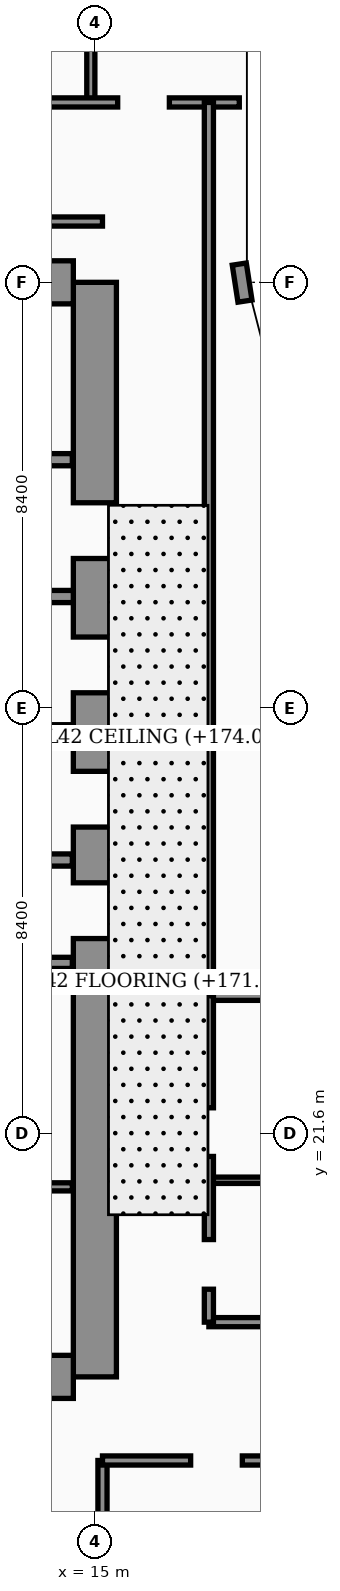
"""IFC4 building model, lengths in metres.
Left out: names, types, materials, properties, quantities, classifications, styles, units other than length and angle.
Written with IfcOpenShell. Run it as: python <this file> out.ifc"""

import sys

from ifc_helpers import new_model, si_unit, direction, frame, frame_2d, origin, place, context, subcontext, project, spatial, rectangle, extrude, element, fill, save


model = new_model("IFC4")
c1 = context("Model", 3, precision=1e-05, world=origin(), true_north=direction((0.0, 1.0)))
c2 = subcontext(c1, "Body", "Model", "MODEL_VIEW")
j1 = project(units=[si_unit("LENGTHUNIT", "METRE"), si_unit("PLANEANGLEUNIT", "RADIAN")], contexts=[c1])
p1 = place(None, origin())
s1 = spatial("IfcSite", under=j1, at=p1, CompositionType="ELEMENT")
p2 = place(p1, origin())
s2 = spatial("IfcBuilding", under=s1, at=p2, CompositionType="ELEMENT")
p3 = place(p2, frame((0.0, 0.0, 171.3)))
s3 = spatial("IfcBuildingStorey", under=s2, at=p3, CompositionType="ELEMENT", Elevation=171.3)
p4 = place(p3, frame((15.0, 16.8, 0.0), z_axis=(0.0, 0.0, 1.0), x_axis=(0.0, 1.0, 0.0)))
e1 = element("IfcWall", 1, at=p4, inside=s3, PredefinedType="SHEAR", context=c2, shape_type="SweptSolid", body=[
    extrude(rectangle(XDim=21.6, YDim=0.85, at=frame_2d((10.8, 0.0))), origin(), (0.0, 0.0, 1.0), 3.56),
])
p5 = place(p4, frame((8.65, 0.0, 0.0)))
e2 = element("IfcOpeningElement", 2, at=p5, cuts=e1, PredefinedType="OPENING", context=c2, shape_type="SweptSolid", body=[
    extrude(rectangle(XDim=1.1, YDim=2.2, at=frame_2d((0.55, 1.1))), frame((0.0, 0.435, 0.0), z_axis=(0.0, -1.0, 0.0), x_axis=(1.0, 0.0, 0.0)), (0.0, 0.0, 1.0), 0.87),
])
p6 = place(p4, frame((10.85, 0.0, 0.0)))
e3 = element("IfcOpeningElement", 3, at=p6, cuts=e1, PredefinedType="OPENING", context=c2, shape_type="SweptSolid", body=[
    extrude(rectangle(XDim=1.1, YDim=2.2, at=frame_2d((0.55, 1.1))), frame((0.0, 0.435, 0.0), z_axis=(0.0, -1.0, 0.0), x_axis=(1.0, 0.0, 0.0)), (0.0, 0.0, 1.0), 0.87),
])
p7 = place(p4, frame((13.5, 0.0, 0.0)))
e4 = element("IfcOpeningElement", 4, at=p7, cuts=e1, PredefinedType="OPENING", context=c2, shape_type="SweptSolid", body=[
    extrude(rectangle(XDim=1.1, YDim=2.2, at=frame_2d((0.55, 1.1))), frame((0.0, 0.435, 0.0), z_axis=(0.0, -1.0, 0.0), x_axis=(1.0, 0.0, 0.0)), (0.0, 0.0, 1.0), 0.87),
])
p8 = place(p4, frame((16.15, 0.0, 0.0)))
e5 = element("IfcOpeningElement", 5, at=p8, cuts=e1, PredefinedType="OPENING", context=c2, shape_type="SweptSolid", body=[
    extrude(rectangle(XDim=1.1, YDim=2.2, at=frame_2d((0.55, 1.1))), frame((0.0, 0.435, 0.0), z_axis=(0.0, -1.0, 0.0), x_axis=(1.0, 0.0, 0.0)), (0.0, 0.0, 1.0), 0.87),
])
for number, where, z_axis, x_axis in (
    (6, (4.625, 38.4, 0.0), (0.0, 0.0, 1.0), (1.0, 0.0, 0.0)),
    (7, (4.625, 16.8, 0.0), (0.0, 0.0, 1.0), (1.0, 0.0, 0.0)),
):
    element("IfcWall", number, at=place(p3, frame(where, z_axis=z_axis, x_axis=x_axis)), inside=s3, PredefinedType="SHEAR", context=c2, shape_type="SweptSolid", body=[
        extrude(rectangle(XDim=9.95, YDim=0.85, at=frame_2d((4.975, 0.0))), origin(), (0.0, 0.0, 1.0), 3.56),
    ])
for number, where, z_axis, x_axis in (
    (8, (12.18, 29.55, 0.0), (0.0, 0.0, 1.0), (1.0, 0.0, 0.0)),
    (9, (12.18, 32.2, 0.0), (0.0, 0.0, 1.0), (1.0, 0.0, 0.0)),
):
    element("IfcWall", number, at=place(p3, frame(where, z_axis=z_axis, x_axis=x_axis)), inside=s3, PredefinedType="SOLIDWALL", context=c2, shape_type="SweptSolid", body=[
        extrude(rectangle(XDim=2.395, YDim=0.24, at=frame_2d((1.198, 0.0))), origin(), (0.0, 0.0, 1.0), 3.56),
    ])
p9 = place(p3, frame((17.962, 38.03, 0.0), z_axis=(0.0, 0.0, 1.0), x_axis=(-0.15141125477, 0.988470855377, 0.0)))
e10 = element("IfcWall", 10, at=p9, inside=s3, PredefinedType="SOLIDWALL", context=c2, shape_type="SweptSolid", body=[
    extrude(rectangle(XDim=0.739, YDim=0.28, at=frame_2d((0.369, 0.0))), origin(), (0.0, 0.0, 1.0), 3.56),
])
p10 = place(p3, frame((9.68, 20.55, 0.0), z_axis=(0.0, 0.0, 1.0), x_axis=(1.0, 0.0, 0.0)))
e11 = element("IfcWall", 11, at=p10, inside=s3, PredefinedType="PARTITIONING", context=c2, shape_type="SweptSolid", body=[
    extrude(rectangle(XDim=4.875, YDim=0.16, at=frame_2d((2.438, 0.0))), origin(), (0.0, 0.0, 1.0), 3.56),
])
p11 = place(p10, frame((1.1, 0.0, 0.0)))
e12 = element("IfcOpeningElement", 12, at=p11, cuts=e11, PredefinedType="OPENING", context=c2, shape_type="SweptSolid", body=[
    extrude(rectangle(XDim=0.98, YDim=2.15, at=frame_2d((0.49, 1.075))), frame((0.0, 0.09, 0.0), z_axis=(0.0, -1.0, 0.0), x_axis=(1.0, 0.0, 0.0)), (0.0, 0.0, 1.0), 0.18),
])
p12 = place(p3, frame((9.68, 24.97, 0.0), z_axis=(0.0, 0.0, 1.0), x_axis=(1.0, 0.0, 0.0)))
e13 = element("IfcWall", 13, at=p12, inside=s3, PredefinedType="SOLIDWALL", context=c2, shape_type="SweptSolid", body=[
    extrude(rectangle(XDim=4.875, YDim=0.22, at=frame_2d((2.438, 0.0))), origin(), (0.0, 0.0, 1.0), 2.94),
])
p13 = place(p12, frame((0.9, 0.0, 0.0)))
e14 = element("IfcOpeningElement", 14, at=p13, cuts=e13, PredefinedType="OPENING", context=c2, shape_type="SweptSolid", body=[
    extrude(rectangle(XDim=0.98, YDim=2.15, at=frame_2d((0.49, 1.075))), frame((0.0, 0.12, 0.0), z_axis=(0.0, -1.0, 0.0), x_axis=(1.0, 0.0, 0.0)), (0.0, 0.0, 1.0), 0.24),
])
p14 = place(p3, frame((12.25, 27.0, 0.0), z_axis=(0.0, 0.0, 1.0), x_axis=(1.0, 0.0, 0.0)))
e15 = element("IfcWall", 15, at=p14, inside=s3, PredefinedType="SOLIDWALL", context=c2, shape_type="SweptSolid", body=[
    extrude(rectangle(XDim=2.305, YDim=0.24, at=frame_2d((1.152, 0.0))), origin(), (0.0, 0.0, 1.0), 3.56),
])
p15 = place(p3, frame((9.66, 34.9, 0.0), z_axis=(0.0, 0.0, 1.0), x_axis=(1.0, 0.0, 0.0)))
e16 = element("IfcWall", 16, at=p15, inside=s3, PredefinedType="SOLIDWALL", context=c2, shape_type="SweptSolid", body=[
    extrude(rectangle(XDim=4.895, YDim=0.24, at=frame_2d((2.448, 0.0))), origin(), (0.0, 0.0, 1.0), 3.56),
])
p16 = place(p3, frame((15.15, 2.44, 0.0), z_axis=(0.0, 0.0, 1.0), x_axis=(0.0, 1.0, 0.0)))
e17 = element("IfcWall", 17, at=p16, inside=s3, PredefinedType="PARTITIONING", context=c2, shape_type="SweptSolid", body=[
    extrude(rectangle(XDim=12.71, YDim=0.18, at=frame_2d((6.355, 0.0))), origin(), (0.0, 0.0, 1.0), 3.04),
])
p17 = place(p3, frame((15.15, 15.15, 0.0), z_axis=(0.0, 0.0, 1.0), x_axis=(1.0, 0.0, 0.0)))
e18 = element("IfcWall", 18, at=p17, inside=s3, PredefinedType="PARTITIONING", context=c2, shape_type="SweptSolid", body=[
    extrude(rectangle(XDim=6.45, YDim=0.18, at=frame_2d((3.225, 0.0))), origin(), (0.0, 0.0, 1.0), 2.49),
])
p18 = place(p17, frame((1.74, 0.0, 0.0)))
e19 = element("IfcOpeningElement", 19, at=p18, cuts=e18, PredefinedType="OPENING", context=c2, shape_type="SweptSolid", body=[
    extrude(rectangle(XDim=1.02, YDim=2.2, at=frame_2d((0.51, 1.1))), frame((0.0, 0.1, 0.0), z_axis=(0.0, -1.0, 0.0), x_axis=(1.0, 0.0, 0.0)), (0.0, 0.0, 1.0), 0.2),
])
p19 = place(p3, frame((14.92, 41.95, 0.0), z_axis=(0.0, 0.0, 1.0), x_axis=(0.0, 1.0, 0.0)))
e20 = element("IfcWall", 20, at=p19, inside=s3, PredefinedType="PARTITIONING", context=c2, shape_type="SweptSolid", body=[
    extrude(rectangle(XDim=5.85, YDim=0.16, at=frame_2d((2.925, 0.0))), origin(), (0.0, 0.0, 1.0), 3.04),
])
p20 = place(p3, frame((0.08, 41.95, 0.0), z_axis=(0.0, 0.0, 1.0), x_axis=(1.0, 0.0, 0.0)))
e21 = element("IfcWall", 21, at=p20, inside=s3, PredefinedType="PARTITIONING", context=c2, shape_type="SweptSolid", body=[
    extrude(rectangle(XDim=17.77, YDim=0.18, at=frame_2d((8.885, 0.0))), origin(), (0.0, 0.0, 1.0), 2.94),
])
p21 = place(p20, frame((0.9, 0.0, 0.0)))
e22 = element("IfcOpeningElement", 22, at=p21, cuts=e21, PredefinedType="OPENING", context=c2, shape_type="SweptSolid", body=[
    extrude(rectangle(XDim=1.02, YDim=2.2, at=frame_2d((0.51, 1.1))), frame((0.0, 0.1, 0.0), z_axis=(0.0, -1.0, 0.0), x_axis=(1.0, 0.0, 0.0)), (0.0, 0.0, 1.0), 0.2),
])
p22 = place(p20, frame((7.38, 0.0, 0.0)))
e23 = element("IfcOpeningElement", 23, at=p22, cuts=e21, PredefinedType="OPENING", context=c2, shape_type="SweptSolid", body=[
    extrude(rectangle(XDim=1.02, YDim=2.2, at=frame_2d((0.51, 1.1))), frame((0.0, 0.1, 0.0), z_axis=(0.0, -1.0, 0.0), x_axis=(1.0, 0.0, 0.0)), (0.0, 0.0, 1.0), 0.2),
])
p23 = place(p20, frame((15.37, 0.0, 0.0)))
e24 = element("IfcOpeningElement", 24, at=p23, cuts=e21, PredefinedType="OPENING", context=c2, shape_type="SweptSolid", body=[
    extrude(rectangle(XDim=1.02, YDim=2.2, at=frame_2d((0.51, 1.1))), frame((0.0, 0.1, 0.0), z_axis=(0.0, -1.0, 0.0), x_axis=(1.0, 0.0, 0.0)), (0.0, 0.0, 1.0), 0.2),
])
p24 = place(p3, frame((17.25, 24.3, 0.0), z_axis=(0.0, 0.0, 1.0), x_axis=(0.0, 1.0, 0.0)))
e25 = element("IfcWall", 25, at=p24, inside=s3, PredefinedType="PARTITIONING", context=c2, shape_type="SweptSolid", body=[
    extrude(rectangle(XDim=17.65, YDim=0.18, at=frame_2d((8.825, 0.0))), origin(), (0.0, 0.0, 1.0), 2.94),
])
p25 = place(p3, frame((3.755, 39.6, 0.0), z_axis=(0.0, 0.0, 1.0), x_axis=(1.0, 0.0, 0.0)))
e26 = element("IfcWall", 26, at=p25, inside=s3, PredefinedType="PARTITIONING", context=c2, shape_type="SweptSolid", body=[
    extrude(rectangle(XDim=11.395, YDim=0.18, at=frame_2d((5.698, 0.0))), origin(), (0.0, 0.0, 1.0), 2.94),
])
p26 = place(p3, frame((17.25, 17.88, 0.0), z_axis=(0.0, 0.0, 1.0), x_axis=(1.0, 0.0, 0.0)))
e27 = element("IfcWall", 27, at=p26, inside=s3, PredefinedType="PARTITIONING", context=c2, shape_type="SweptSolid", body=[
    extrude(rectangle(XDim=4.3, YDim=0.18, at=frame_2d((2.15, 0.0))), origin(), (0.0, 0.0, 1.0), 3.09),
])
p27 = place(p3, frame((17.25, 20.68, 0.0), z_axis=(0.0, 0.0, 1.0), x_axis=(1.0, 0.0, 0.0)))
e28 = element("IfcWall", 28, at=p27, inside=s3, PredefinedType="PARTITIONING", context=c2, shape_type="SweptSolid", body=[
    extrude(rectangle(XDim=4.3, YDim=0.125, at=frame_2d((2.15, 0.0))), origin(), (0.0, 0.0, 1.0), 3.56),
])
p28 = place(p3, frame((17.25, 24.32, 0.0), z_axis=(0.0, 0.0, 1.0), x_axis=(1.0, 0.0, 0.0)))
e29 = element("IfcWall", 29, at=p28, inside=s3, PredefinedType="PARTITIONING", context=c2, shape_type="SweptSolid", body=[
    extrude(rectangle(XDim=4.35, YDim=0.18, at=frame_2d((2.175, 0.0))), origin(), (0.0, 0.0, 1.0), 3.56),
])
p29 = place(p3, frame((17.25, 17.88, 0.0), z_axis=(0.0, 0.0, 1.0), x_axis=(0.0, 1.0, 0.0)))
e30 = element("IfcWall", 30, at=p29, inside=s3, PredefinedType="PARTITIONING", context=c2, shape_type="SweptSolid", body=[
    extrude(rectangle(XDim=6.44, YDim=0.18, at=frame_2d((3.22, 0.0))), origin(), (0.0, 0.0, 1.0), 3.09),
])
p30 = place(p29, frame((0.65, 0.0, 0.0)))
e31 = element("IfcOpeningElement", 31, at=p30, cuts=e30, PredefinedType="OPENING", context=c2, shape_type="SweptSolid", body=[
    extrude(rectangle(XDim=0.98, YDim=2.15, at=frame_2d((0.49, 1.075))), frame((0.0, 0.1, 0.0), z_axis=(0.0, -1.0, 0.0), x_axis=(1.0, 0.0, 0.0)), (0.0, 0.0, 1.0), 0.2),
])
p31 = place(p29, frame((3.27, 0.0, 0.0)))
e32 = element("IfcOpeningElement", 32, at=p31, cuts=e30, PredefinedType="OPENING", context=c2, shape_type="SweptSolid", body=[
    extrude(rectangle(XDim=0.96, YDim=2.2, at=frame_2d((0.48, 1.1))), frame((0.0, 0.1, 0.0), z_axis=(0.0, -1.0, 0.0), x_axis=(1.0, 0.0, 0.0)), (0.0, 0.0, 1.0), 0.2),
])
p32 = place(p18, origin())
e33 = element("IfcDoor", 33, at=p32, inside=s3, OperationType="SINGLE_SWING_LEFT", PredefinedType="DOOR", context=c2, shape_type="SweptSolid", body=[
    extrude(rectangle(XDim=1.02, YDim=2.2, at=frame_2d((0.51, 1.1))), frame((0.0, 0.025, 0.0), z_axis=(0.0, -1.0, 0.0), x_axis=(1.0, 0.0, 0.0)), (0.0, 0.0, 1.0), 0.05),
])
fill(e19, e33)
p33 = place(p23, origin())
e34 = element("IfcDoor", 34, at=p33, inside=s3, OperationType="SINGLE_SWING_RIGHT", PredefinedType="DOOR", context=c2, shape_type="SweptSolid", body=[
    extrude(rectangle(XDim=1.02, YDim=2.2, at=frame_2d((0.51, 1.1))), frame((0.0, 0.025, 0.0), z_axis=(0.0, -1.0, 0.0), x_axis=(1.0, 0.0, 0.0)), (0.0, 0.0, 1.0), 0.05),
])
fill(e24, e34)
p34 = place(p30, origin())
e35 = element("IfcDoor", 35, at=p34, inside=s3, OperationType="SINGLE_SWING_LEFT", PredefinedType="DOOR", context=c2, shape_type="SweptSolid", body=[
    extrude(rectangle(XDim=0.98, YDim=2.15, at=frame_2d((0.49, 1.075))), frame((0.0, 0.025, 0.0), z_axis=(0.0, -1.0, 0.0), x_axis=(1.0, 0.0, 0.0)), (0.0, 0.0, 1.0), 0.05),
])
fill(e31, e35)
p35 = place(p31, origin())
e36 = element("IfcDoor", 36, at=p35, inside=s3, OperationType="SINGLE_SWING_RIGHT", PredefinedType="DOOR", context=c2, shape_type="SweptSolid", body=[
    extrude(rectangle(XDim=0.96, YDim=2.2, at=frame_2d((0.48, 1.1))), frame((0.0, 0.025, 0.0), z_axis=(0.0, -1.0, 0.0), x_axis=(1.0, 0.0, 0.0)), (0.0, 0.0, 1.0), 0.05),
])
fill(e32, e36)
p36 = place(p5, origin())
e37 = element("IfcDoor", 37, at=p36, inside=s3, OperationType="SINGLE_SWING_LEFT", PredefinedType="DOOR", context=c2, shape_type="SweptSolid", body=[
    extrude(rectangle(XDim=1.1, YDim=2.2, at=frame_2d((0.55, 1.1))), frame((0.0, 0.025, 0.0), z_axis=(0.0, -1.0, 0.0), x_axis=(1.0, 0.0, 0.0)), (0.0, 0.0, 1.0), 0.05),
])
fill(e2, e37)
p37 = place(p6, origin())
e38 = element("IfcDoor", 38, at=p37, inside=s3, OperationType="DOUBLE_DOOR_SLIDING", PredefinedType="DOOR", context=c2, shape_type="SweptSolid", body=[
    extrude(rectangle(XDim=1.1, YDim=2.2, at=frame_2d((0.55, 1.1))), frame((0.0, 0.025, 0.0), z_axis=(0.0, -1.0, 0.0), x_axis=(1.0, 0.0, 0.0)), (0.0, 0.0, 1.0), 0.05),
])
fill(e3, e38)
p38 = place(p7, origin())
e39 = element("IfcDoor", 39, at=p38, inside=s3, OperationType="DOUBLE_DOOR_SLIDING", PredefinedType="DOOR", context=c2, shape_type="SweptSolid", body=[
    extrude(rectangle(XDim=1.1, YDim=2.2, at=frame_2d((0.55, 1.1))), frame((0.0, 0.025, 0.0), z_axis=(0.0, -1.0, 0.0), x_axis=(1.0, 0.0, 0.0)), (0.0, 0.0, 1.0), 0.05),
])
fill(e4, e39)
p39 = place(p8, origin())
e40 = element("IfcDoor", 40, at=p39, inside=s3, OperationType="DOUBLE_DOOR_SLIDING", PredefinedType="DOOR", context=c2, shape_type="SweptSolid", body=[
    extrude(rectangle(XDim=1.1, YDim=2.2, at=frame_2d((0.55, 1.1))), frame((0.0, 0.025, 0.0), z_axis=(0.0, -1.0, 0.0), x_axis=(1.0, 0.0, 0.0)), (0.0, 0.0, 1.0), 0.05),
])
fill(e5, e40)
save(model, sys.argv[1])
